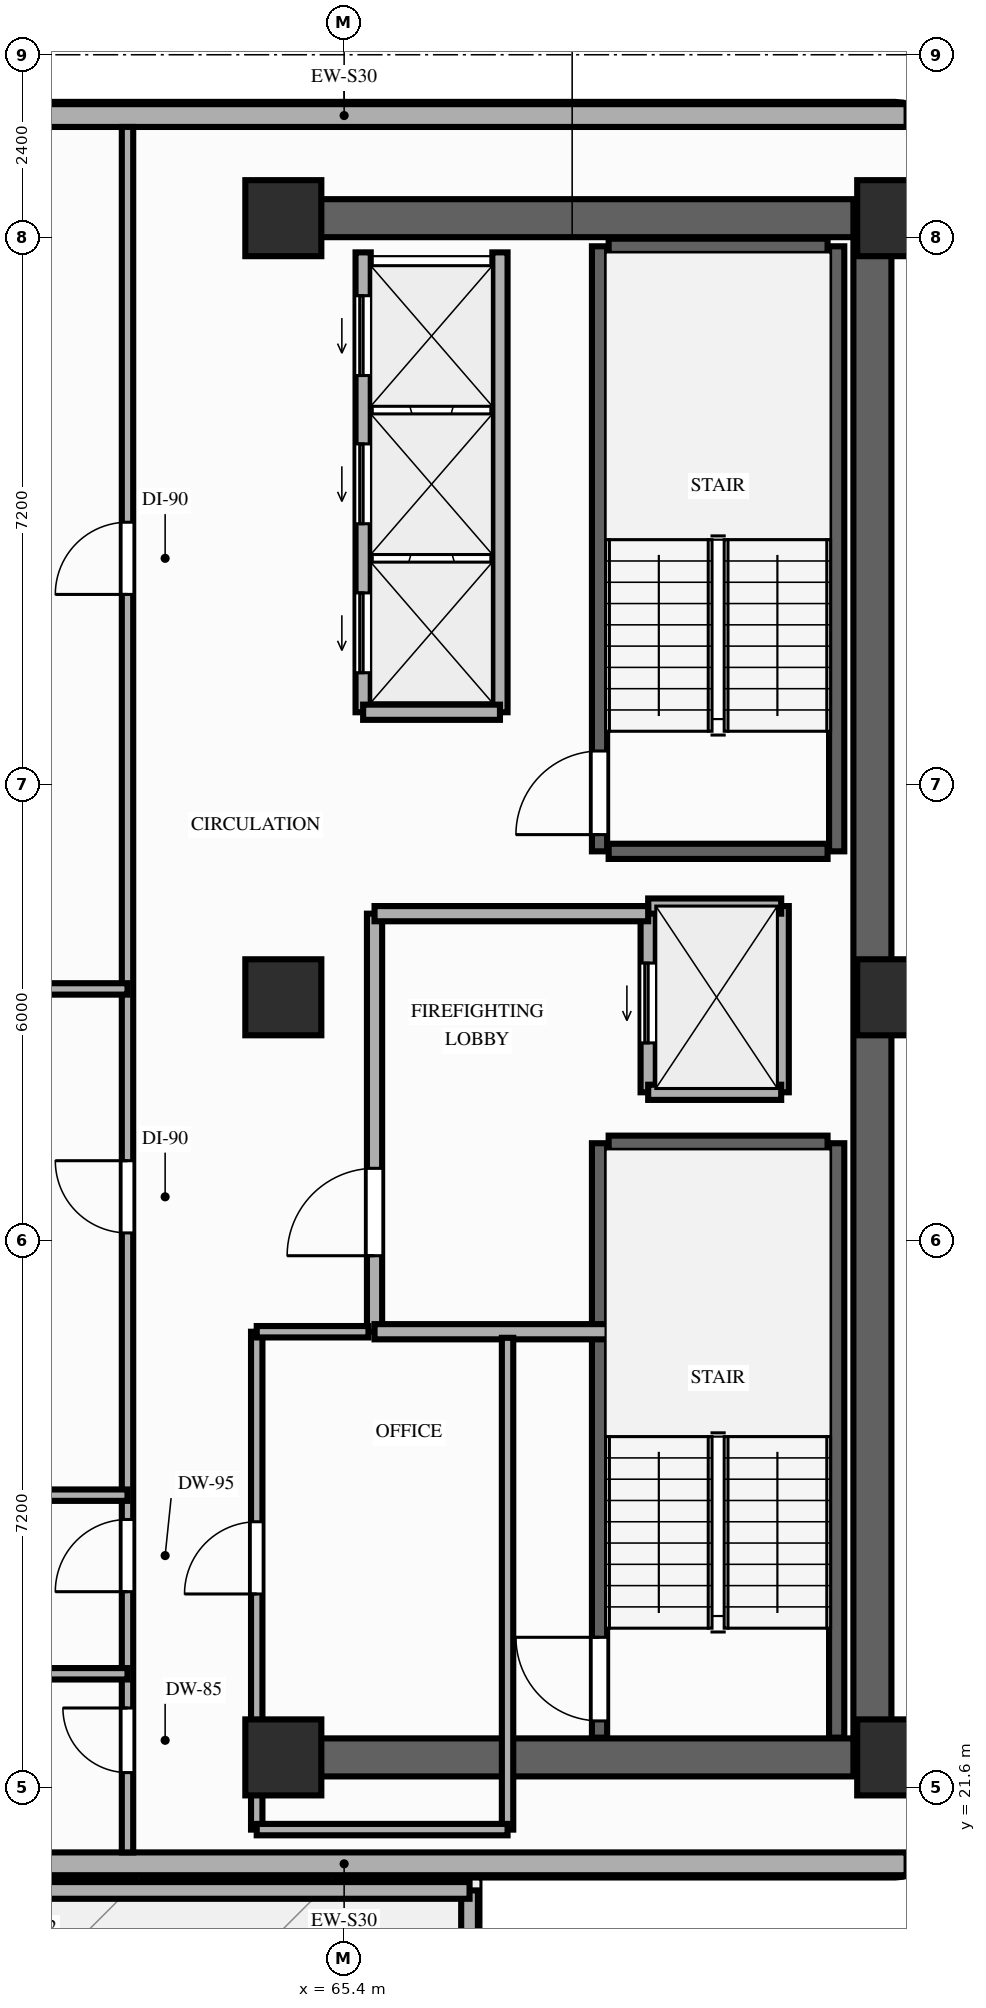
"""IFC4 building model, lengths in metres.
Left out: names, types, materials, properties, quantities, classifications, styles, units other than length and angle.
Written with IfcOpenShell. Run it as: python <this file> out.ifc"""

import sys

from ifc_helpers import new_model, si_unit, direction, frame, frame_2d, origin, origin_2d, place, context, subcontext, project, spatial, rectangle, extrude, element, fill, save


model = new_model("IFC4")
c1 = context("Model", 3, precision=1e-05, world=origin(), true_north=direction((0.0, 1.0)))
c2 = subcontext(c1, "Body", "Model", "MODEL_VIEW")
j1 = project(units=[si_unit("LENGTHUNIT", "METRE"), si_unit("PLANEANGLEUNIT", "RADIAN")], contexts=[c1])
p1 = place(None, origin())
s1 = spatial("IfcSite", under=j1, at=p1, CompositionType="ELEMENT")
p2 = place(p1, origin())
s2 = spatial("IfcBuilding", under=s1, at=p2, CompositionType="ELEMENT")
p3 = place(p2, frame((0.0, 0.0, 86.6)))
s3 = spatial("IfcBuildingStorey", under=s2, at=p3, CompositionType="ELEMENT", Elevation=86.6)
for number, where, z_axis, x_axis in (
    (1, (64.6, 22.0, 0.0), (0.0, 0.0, 1.0), (1.0, 0.0, 0.0)),
    (2, (72.65, 22.0, 0.0), (0.0, 0.0, 1.0), (1.0, 0.0, 0.0)),
    (3, (64.6, 32.0, 0.0), (0.0, 0.0, 1.0), (1.0, 0.0, 0.0)),
    (4, (72.65, 32.0, 0.0), (0.0, 0.0, 1.0), (1.0, 0.0, 0.0)),
    (5, (64.6, 42.25, 0.0), (0.0, 0.0, 1.0), (1.0, 0.0, 0.0)),
    (6, (72.65, 42.25, 0.0), (0.0, 0.0, 1.0), (1.0, 0.0, 0.0)),
):
    element("IfcColumn", number, at=place(p3, frame(where, z_axis=z_axis, x_axis=x_axis)), inside=s3, PredefinedType="COLUMN", context=c2, shape_type="SweptSolid", body=[
        extrude(rectangle(XDim=1.0, YDim=1.0, at=origin_2d()), origin(), (0.0, 0.0, 1.0), 3.2),
    ])
for number, where, z_axis, x_axis in (
    (7, (72.8, 43.6, 0.0), (0.0, 0.0, 1.0), (-1.0, 0.0, 0.0)),
    (8, (58.0, 20.6, 0.0), (0.0, 0.0, 1.0), (1.0, 0.0, 0.0)),
):
    element("IfcWall", number, at=place(p3, frame(where, z_axis=z_axis, x_axis=x_axis)), inside=s3, PredefinedType="STANDARD", context=c2, shape_type="SweptSolid", body=[
        extrude(rectangle(XDim=14.8, YDim=0.3, at=frame_2d((7.4, 0.0))), origin(), (0.0, 0.0, 1.0), 3.02),
    ])
p4 = place(p3, frame((67.05, 7.35, 0.0), z_axis=(0.0, 0.0, 1.0), x_axis=(0.0, 1.0, 0.0)))
e9 = element("IfcWall", 9, at=p4, inside=s3, PredefinedType="PARAPET", context=c2, shape_type="SweptSolid", body=[
    extrude(rectangle(XDim=12.9, YDim=0.22, at=frame_2d((6.45, 0.0))), origin(), (0.0, 0.0, 1.0), 1.15),
])
p5 = place(p3, frame((67.05, 20.25, 0.0), z_axis=(0.0, 0.0, 1.0), x_axis=(-1.0, 0.0, 0.0)))
e10 = element("IfcWall", 10, at=p5, inside=s3, PredefinedType="PARAPET", context=c2, shape_type="SweptSolid", body=[
    extrude(rectangle(XDim=11.7, YDim=0.22, at=frame_2d((5.85, 0.0))), origin(), (0.0, 0.0, 1.0), 1.15),
])
p6 = place(p3, frame((72.35, 22.0, 0.0), z_axis=(0.0, 0.0, 1.0), x_axis=(0.0, 1.0, 0.0)))
e11 = element("IfcWall", 11, at=p6, inside=s3, PredefinedType="SHEAR", context=c2, shape_type="SweptSolid", body=[
    extrude(rectangle(XDim=20.25, YDim=0.5, at=frame_2d((10.125, 0.0))), origin(), (0.0, 0.0, 1.0), 3.02),
])
for number, where, z_axis, x_axis in (
    (12, (64.6, 42.25, 0.0), (0.0, 0.0, 1.0), (1.0, 0.0, 0.0)),
    (13, (64.6, 22.0, 0.0), (0.0, 0.0, 1.0), (1.0, 0.0, 0.0)),
):
    element("IfcWall", number, at=place(p3, frame(where, z_axis=z_axis, x_axis=x_axis)), inside=s3, PredefinedType="SHEAR", context=c2, shape_type="SweptSolid", body=[
        extrude(rectangle(XDim=7.5, YDim=0.5, at=frame_2d((3.75, 0.0))), origin(), (0.0, 0.0, 1.0), 3.02),
    ])
p7 = place(p3, frame((68.76, 22.26, 0.0), z_axis=(0.0, 0.0, 1.0), x_axis=(0.0, 1.0, 0.0)))
e14 = element("IfcWall", 14, at=p7, inside=s3, PredefinedType="SHEAR", context=c2, shape_type="SweptSolid", body=[
    extrude(rectangle(XDim=7.82, YDim=0.2, at=frame_2d((3.91, 0.0))), origin(), (0.0, 0.0, 1.0), 3.02),
])
p8 = place(p7, frame((0.22, 0.0, 0.0)))
e15 = element("IfcOpeningElement", 15, at=p8, cuts=e14, PredefinedType="OPENING", context=c2, shape_type="SweptSolid", body=[
    extrude(rectangle(XDim=1.1, YDim=2.15, at=frame_2d((0.55, 1.075))), frame((0.0, 0.11, 0.0), z_axis=(0.0, -1.0, 0.0), x_axis=(1.0, 0.0, 0.0)), (0.0, 0.0, 1.0), 0.22),
])
p9 = place(p3, frame((71.88, 22.26, 0.0), z_axis=(0.0, 0.0, 1.0), x_axis=(0.0, 1.0, 0.0)))
e16 = element("IfcWall", 16, at=p9, inside=s3, PredefinedType="SHEAR", context=c2, shape_type="SweptSolid", body=[
    extrude(rectangle(XDim=7.82, YDim=0.2, at=frame_2d((3.91, 0.0))), origin(), (0.0, 0.0, 1.0), 3.02),
])
p10 = place(p3, frame((68.88, 30.08, 0.0), z_axis=(0.0, 0.0, 1.0), x_axis=(1.0, 0.0, 0.0)))
e17 = element("IfcWall", 17, at=p10, inside=s3, PredefinedType="SHEAR", context=c2, shape_type="SweptSolid", body=[
    extrude(rectangle(XDim=2.88, YDim=0.2, at=frame_2d((1.44, 0.0))), origin(), (0.0, 0.0, 1.0), 3.02),
])
p11 = place(p3, frame((68.76, 33.92, 0.0), z_axis=(0.0, 0.0, 1.0), x_axis=(0.0, 1.0, 0.0)))
e18 = element("IfcWall", 18, at=p11, inside=s3, PredefinedType="SHEAR", context=c2, shape_type="SweptSolid", body=[
    extrude(rectangle(XDim=7.96, YDim=0.2, at=frame_2d((3.98, 0.0))), origin(), (0.0, 0.0, 1.0), 3.02),
])
p12 = place(p11, frame((0.22, 0.0, 0.0)))
e19 = element("IfcOpeningElement", 19, at=p12, cuts=e18, PredefinedType="OPENING", context=c2, shape_type="SweptSolid", body=[
    extrude(rectangle(XDim=1.1, YDim=2.15, at=frame_2d((0.55, 1.075))), frame((0.0, 0.11, 0.0), z_axis=(0.0, -1.0, 0.0), x_axis=(1.0, 0.0, 0.0)), (0.0, 0.0, 1.0), 0.22),
])
p13 = place(p3, frame((71.88, 33.92, 0.0), z_axis=(0.0, 0.0, 1.0), x_axis=(0.0, 1.0, 0.0)))
e20 = element("IfcWall", 20, at=p13, inside=s3, PredefinedType="SHEAR", context=c2, shape_type="SweptSolid", body=[
    extrude(rectangle(XDim=7.96, YDim=0.2, at=frame_2d((3.98, 0.0))), origin(), (0.0, 0.0, 1.0), 3.02),
])
for number, where, z_axis, x_axis in (
    (21, (68.88, 41.88, 0.0), (0.0, 0.0, 1.0), (1.0, 0.0, 0.0)),
    (22, (68.88, 33.92, 0.0), (0.0, 0.0, 1.0), (1.0, 0.0, 0.0)),
):
    element("IfcWall", number, at=place(p3, frame(where, z_axis=z_axis, x_axis=x_axis)), inside=s3, PredefinedType="SHEAR", context=c2, shape_type="SweptSolid", body=[
        extrude(rectangle(XDim=2.88, YDim=0.2, at=frame_2d((1.44, 0.0))), origin(), (0.0, 0.0, 1.0), 3.02),
    ])
p14 = place(p3, frame((65.65, 35.75, 0.0), z_axis=(0.0, 0.0, 1.0), x_axis=(0.0, 1.0, 0.0)))
e23 = element("IfcWall", 23, at=p14, inside=s3, PredefinedType="MOVABLE", context=c2, shape_type="SweptSolid", body=[
    extrude(rectangle(XDim=6.05, YDim=0.2, at=frame_2d((3.025, 0.0))), origin(), (0.0, 0.0, 1.0), 3.02),
])
p15 = place(p14, frame((0.52, 0.0, 0.0)))
e24 = element("IfcOpeningElement", 24, at=p15, cuts=e23, PredefinedType="OPENING", context=c2, shape_type="SweptSolid", body=[
    extrude(rectangle(XDim=1.05, YDim=2.15, at=frame_2d((0.525, 1.075))), frame((0.0, 0.11, 0.0), z_axis=(0.0, -1.0, 0.0), x_axis=(1.0, 0.0, 0.0)), (0.0, 0.0, 1.0), 0.22),
])
p16 = place(p14, frame((2.48, 0.0, 0.0)))
e25 = element("IfcOpeningElement", 25, at=p16, cuts=e23, PredefinedType="OPENING", context=c2, shape_type="SweptSolid", body=[
    extrude(rectangle(XDim=1.05, YDim=2.15, at=frame_2d((0.525, 1.075))), frame((0.0, 0.11, 0.0), z_axis=(0.0, -1.0, 0.0), x_axis=(1.0, 0.0, 0.0)), (0.0, 0.0, 1.0), 0.22),
])
p17 = place(p14, frame((4.43, 0.0, 0.0)))
e26 = element("IfcOpeningElement", 26, at=p17, cuts=e23, PredefinedType="OPENING", context=c2, shape_type="SweptSolid", body=[
    extrude(rectangle(XDim=1.05, YDim=2.15, at=frame_2d((0.525, 1.075))), frame((0.0, 0.11, 0.0), z_axis=(0.0, -1.0, 0.0), x_axis=(1.0, 0.0, 0.0)), (0.0, 0.0, 1.0), 0.22),
])
p18 = place(p3, frame((67.45, 35.75, 0.0), z_axis=(0.0, 0.0, 1.0), x_axis=(0.0, 1.0, 0.0)))
e27 = element("IfcWall", 27, at=p18, inside=s3, PredefinedType="MOVABLE", context=c2, shape_type="SweptSolid", body=[
    extrude(rectangle(XDim=6.05, YDim=0.2, at=frame_2d((3.025, 0.0))), origin(), (0.0, 0.0, 1.0), 3.02),
])
p19 = place(p3, frame((65.65, 35.75, 0.0), z_axis=(0.0, 0.0, 1.0), x_axis=(1.0, 0.0, 0.0)))
e28 = element("IfcWall", 28, at=p19, inside=s3, PredefinedType="MOVABLE", context=c2, shape_type="SweptSolid", body=[
    extrude(rectangle(XDim=1.8, YDim=0.2, at=frame_2d((0.9, 0.0))), origin(), (0.0, 0.0, 1.0), 3.02),
])
p20 = place(p3, frame((69.4, 30.75, 0.0), z_axis=(0.0, 0.0, 1.0), x_axis=(0.0, 1.0, 0.0)))
e29 = element("IfcWall", 29, at=p20, inside=s3, PredefinedType="MOVABLE", context=c2, shape_type="SweptSolid", body=[
    extrude(rectangle(XDim=2.45, YDim=0.2, at=frame_2d((1.225, 0.0))), origin(), (0.0, 0.0, 1.0), 3.02),
])
p21 = place(p20, frame((0.65, 0.0, 0.0)))
e30 = element("IfcOpeningElement", 30, at=p21, cuts=e29, PredefinedType="OPENING", context=c2, shape_type="SweptSolid", body=[
    extrude(rectangle(XDim=1.05, YDim=2.15, at=frame_2d((0.525, 1.075))), frame((0.0, 0.11, 0.0), z_axis=(0.0, -1.0, 0.0), x_axis=(1.0, 0.0, 0.0)), (0.0, 0.0, 1.0), 0.22),
])
p22 = place(p3, frame((71.15, 30.75, 0.0), z_axis=(0.0, 0.0, 1.0), x_axis=(0.0, 1.0, 0.0)))
e31 = element("IfcWall", 31, at=p22, inside=s3, PredefinedType="MOVABLE", context=c2, shape_type="SweptSolid", body=[
    extrude(rectangle(XDim=2.45, YDim=0.2, at=frame_2d((1.225, 0.0))), origin(), (0.0, 0.0, 1.0), 3.02),
])
for number, where, z_axis, x_axis in (
    (32, (69.4, 33.2, 0.0), (0.0, 0.0, 1.0), (1.0, 0.0, 0.0)),
    (33, (69.4, 30.75, 0.0), (0.0, 0.0, 1.0), (1.0, 0.0, 0.0)),
):
    element("IfcWall", number, at=place(p3, frame(where, z_axis=z_axis, x_axis=x_axis)), inside=s3, PredefinedType="MOVABLE", context=c2, shape_type="SweptSolid", body=[
        extrude(rectangle(XDim=1.75, YDim=0.2, at=frame_2d((0.875, 0.0))), origin(), (0.0, 0.0, 1.0), 3.02),
    ])
p23 = place(p3, frame((65.8, 27.6, 0.0), z_axis=(0.0, 0.0, 1.0), x_axis=(0.0, 1.0, 0.0)))
e34 = element("IfcWall", 34, at=p23, inside=s3, PredefinedType="PARTITIONING", context=c2, shape_type="SweptSolid", body=[
    extrude(rectangle(XDim=5.5, YDim=0.2, at=frame_2d((2.75, 0.0))), origin(), (0.0, 0.0, 1.0), 3.02),
])
p24 = place(p23, frame((1.0, 0.0, 0.0)))
e35 = element("IfcOpeningElement", 35, at=p24, cuts=e34, PredefinedType="OPENING", context=c2, shape_type="SweptSolid", body=[
    extrude(rectangle(XDim=1.15, YDim=2.15, at=frame_2d((0.575, 1.075))), frame((0.0, 0.11, 0.0), z_axis=(0.0, -1.0, 0.0), x_axis=(1.0, 0.0, 0.0)), (0.0, 0.0, 1.0), 0.22),
])
p25 = place(p3, frame((65.8, 33.1, 0.0), z_axis=(0.0, 0.0, 1.0), x_axis=(1.0, 0.0, 0.0)))
e36 = element("IfcWall", 36, at=p25, inside=s3, PredefinedType="PARTITIONING", context=c2, shape_type="SweptSolid", body=[
    extrude(rectangle(XDim=3.6, YDim=0.2, at=frame_2d((1.8, 0.0))), origin(), (0.0, 0.0, 1.0), 3.02),
])
p26 = place(p3, frame((65.8, 27.6, 0.0), z_axis=(0.0, 0.0, 1.0), x_axis=(1.0, 0.0, 0.0)))
e37 = element("IfcWall", 37, at=p26, inside=s3, PredefinedType="PARTITIONING", context=c2, shape_type="SweptSolid", body=[
    extrude(rectangle(XDim=3.4, YDim=0.2, at=frame_2d((1.7, 0.0))), origin(), (0.0, 0.0, 1.0), 3.02),
])
p27 = place(p3, frame((64.25, 21.05, 0.0), z_axis=(0.0, 0.0, 1.0), x_axis=(0.0, 1.0, 0.0)))
e38 = element("IfcWall", 38, at=p27, inside=s3, PredefinedType="PARTITIONING", context=c2, shape_type="SweptSolid", body=[
    extrude(rectangle(XDim=6.55, YDim=0.15, at=frame_2d((3.275, 0.0))), origin(), (0.0, 0.0, 1.0), 2.6),
])
p28 = place(p27, frame((3.1, 0.0, 0.0)))
e39 = element("IfcOpeningElement", 39, at=p28, cuts=e38, PredefinedType="OPENING", context=c2, shape_type="SweptSolid", body=[
    extrude(rectangle(XDim=0.95, YDim=2.15, at=frame_2d((0.475, 1.075))), frame((0.0, 0.085, 0.0), z_axis=(0.0, -1.0, 0.0), x_axis=(1.0, 0.0, 0.0)), (0.0, 0.0, 1.0), 0.17),
])
p29 = place(p3, frame((67.55, 21.05, 0.0), z_axis=(0.0, 0.0, 1.0), x_axis=(0.0, 1.0, 0.0)))
e40 = element("IfcWall", 40, at=p29, inside=s3, PredefinedType="PARTITIONING", context=c2, shape_type="SweptSolid", body=[
    extrude(rectangle(XDim=6.47, YDim=0.15, at=frame_2d((3.235, 0.0))), origin(), (0.0, 0.0, 1.0), 2.6),
])
p30 = place(p3, frame((64.25, 21.05, 0.0), z_axis=(0.0, 0.0, 1.0), x_axis=(1.0, 0.0, 0.0)))
e41 = element("IfcWall", 41, at=p30, inside=s3, PredefinedType="PARTITIONING", context=c2, shape_type="SweptSolid", body=[
    extrude(rectangle(XDim=3.3, YDim=0.15, at=frame_2d((1.65, 0.0))), origin(), (0.0, 0.0, 1.0), 3.02),
])
p31 = place(p3, frame((64.25, 27.6, 0.0), z_axis=(0.0, 0.0, 1.0), x_axis=(1.0, 0.0, 0.0)))
e42 = element("IfcWall", 42, at=p31, inside=s3, PredefinedType="PARTITIONING", context=c2, shape_type="SweptSolid", body=[
    extrude(rectangle(XDim=1.47, YDim=0.15, at=frame_2d((0.735, 0.0))), origin(), (0.0, 0.0, 1.0), 2.6),
])
p32 = place(p3, frame((62.55, 20.75, 0.0), z_axis=(0.0, 0.0, 1.0), x_axis=(0.0, 1.0, 0.0)))
e43 = element("IfcWall", 43, at=p32, inside=s3, PredefinedType="PARTITIONING", context=c2, shape_type="SweptSolid", body=[
    extrude(rectangle(XDim=22.7, YDim=0.15, at=frame_2d((11.35, 0.0))), origin(), (0.0, 0.0, 1.0), 2.6),
])
p33 = place(p32, frame((1.05, 0.0, 0.0)))
e44 = element("IfcOpeningElement", 44, at=p33, cuts=e43, PredefinedType="OPENING", context=c2, shape_type="SweptSolid", body=[
    extrude(rectangle(XDim=0.85, YDim=2.1, at=frame_2d((0.425, 1.05))), frame((0.0, 0.085, 0.0), z_axis=(0.0, -1.0, 0.0), x_axis=(1.0, 0.0, 0.0)), (0.0, 0.0, 1.0), 0.17),
])
p34 = place(p32, frame((3.43, 0.0, 0.0)))
e45 = element("IfcOpeningElement", 45, at=p34, cuts=e43, PredefinedType="OPENING", context=c2, shape_type="SweptSolid", body=[
    extrude(rectangle(XDim=0.95, YDim=2.1, at=frame_2d((0.475, 1.05))), frame((0.0, 0.085, 0.0), z_axis=(0.0, -1.0, 0.0), x_axis=(1.0, 0.0, 0.0)), (0.0, 0.0, 1.0), 0.17),
])
p35 = place(p32, frame((8.15, 0.0, 0.0)))
e46 = element("IfcOpeningElement", 46, at=p35, cuts=e43, PredefinedType="OPENING", context=c2, shape_type="SweptSolid", body=[
    extrude(rectangle(XDim=0.95, YDim=2.15, at=frame_2d((0.475, 1.075))), frame((0.0, 0.085, 0.0), z_axis=(0.0, -1.0, 0.0), x_axis=(1.0, 0.0, 0.0)), (0.0, 0.0, 1.0), 0.17),
])
p36 = place(p32, frame((16.55, 0.0, 0.0)))
e47 = element("IfcOpeningElement", 47, at=p36, cuts=e43, PredefinedType="OPENING", context=c2, shape_type="SweptSolid", body=[
    extrude(rectangle(XDim=0.95, YDim=2.15, at=frame_2d((0.475, 1.075))), frame((0.0, 0.085, 0.0), z_axis=(0.0, -1.0, 0.0), x_axis=(1.0, 0.0, 0.0)), (0.0, 0.0, 1.0), 0.17),
])
for number, where, z_axis, x_axis in (
    (48, (57.95, 23.1, 0.0), (0.0, 0.0, 1.0), (1.0, 0.0, 0.0)),
    (49, (57.95, 25.45, 0.0), (0.0, 0.0, 1.0), (1.0, 0.0, 0.0)),
    (50, (57.95, 32.11, 0.0), (0.0, 0.0, 1.0), (1.0, 0.0, 0.0)),
):
    element("IfcWall", number, at=place(p3, frame(where, z_axis=z_axis, x_axis=x_axis)), inside=s3, PredefinedType="PARTITIONING", context=c2, shape_type="SweptSolid", body=[
        extrude(rectangle(XDim=4.6, YDim=0.15, at=frame_2d((2.3, 0.0))), origin(), (0.0, 0.0, 1.0), 2.6),
    ])
p37 = place(p8, origin())
e51 = element("IfcDoor", 51, at=p37, inside=s3, OperationType="SINGLE_SWING_RIGHT", PredefinedType="DOOR", context=c2, shape_type="SweptSolid", body=[
    extrude(rectangle(XDim=1.1, YDim=2.15, at=frame_2d((0.55, 1.075))), frame((0.0, 0.025, 0.0), z_axis=(0.0, -1.0, 0.0), x_axis=(1.0, 0.0, 0.0)), (0.0, 0.0, 1.0), 0.05),
])
fill(e15, e51)
p38 = place(p12, origin())
e52 = element("IfcDoor", 52, at=p38, inside=s3, OperationType="SINGLE_SWING_LEFT", PredefinedType="DOOR", context=c2, shape_type="SweptSolid", body=[
    extrude(rectangle(XDim=1.1, YDim=2.15, at=frame_2d((0.55, 1.075))), frame((0.0, 0.025, 0.0), z_axis=(0.0, -1.0, 0.0), x_axis=(1.0, 0.0, 0.0)), (0.0, 0.0, 1.0), 0.05),
])
fill(e19, e52)
p39 = place(p15, origin())
e53 = element("IfcDoor", 53, at=p39, inside=s3, OperationType="SLIDING_TO_LEFT", PredefinedType="DOOR", context=c2, shape_type="SweptSolid", body=[
    extrude(rectangle(XDim=1.05, YDim=2.15, at=frame_2d((0.525, 1.075))), frame((0.0, 0.025, 0.0), z_axis=(0.0, -1.0, 0.0), x_axis=(1.0, 0.0, 0.0)), (0.0, 0.0, 1.0), 0.05),
])
fill(e24, e53)
p40 = place(p16, origin())
e54 = element("IfcDoor", 54, at=p40, inside=s3, OperationType="SLIDING_TO_LEFT", PredefinedType="DOOR", context=c2, shape_type="SweptSolid", body=[
    extrude(rectangle(XDim=1.05, YDim=2.15, at=frame_2d((0.525, 1.075))), frame((0.0, 0.025, 0.0), z_axis=(0.0, -1.0, 0.0), x_axis=(1.0, 0.0, 0.0)), (0.0, 0.0, 1.0), 0.05),
])
fill(e25, e54)
p41 = place(p17, origin())
e55 = element("IfcDoor", 55, at=p41, inside=s3, OperationType="SLIDING_TO_LEFT", PredefinedType="DOOR", context=c2, shape_type="SweptSolid", body=[
    extrude(rectangle(XDim=1.05, YDim=2.15, at=frame_2d((0.525, 1.075))), frame((0.0, 0.025, 0.0), z_axis=(0.0, -1.0, 0.0), x_axis=(1.0, 0.0, 0.0)), (0.0, 0.0, 1.0), 0.05),
])
fill(e26, e55)
p42 = place(p21, origin())
e56 = element("IfcDoor", 56, at=p42, inside=s3, OperationType="SLIDING_TO_LEFT", PredefinedType="DOOR", context=c2, shape_type="SweptSolid", body=[
    extrude(rectangle(XDim=1.05, YDim=2.15, at=frame_2d((0.525, 1.075))), frame((0.0, 0.025, 0.0), z_axis=(0.0, -1.0, 0.0), x_axis=(1.0, 0.0, 0.0)), (0.0, 0.0, 1.0), 0.05),
])
fill(e30, e56)
p43 = place(p24, origin())
e57 = element("IfcDoor", 57, at=p43, inside=s3, OperationType="SINGLE_SWING_LEFT", PredefinedType="DOOR", context=c2, shape_type="SweptSolid", body=[
    extrude(rectangle(XDim=1.15, YDim=2.15, at=frame_2d((0.575, 1.075))), frame((0.0, 0.025, 0.0), z_axis=(0.0, -1.0, 0.0), x_axis=(1.0, 0.0, 0.0)), (0.0, 0.0, 1.0), 0.05),
])
fill(e35, e57)
p44 = place(p28, origin())
e58 = element("IfcDoor", 58, at=p44, inside=s3, OperationType="SINGLE_SWING_LEFT", PredefinedType="DOOR", context=c2, shape_type="SweptSolid", body=[
    extrude(rectangle(XDim=0.95, YDim=2.15, at=frame_2d((0.475, 1.075))), frame((0.0, 0.025, 0.0), z_axis=(0.0, -1.0, 0.0), x_axis=(1.0, 0.0, 0.0)), (0.0, 0.0, 1.0), 0.05),
])
fill(e39, e58)
p45 = place(p33, origin())
e59 = element("IfcDoor", 59, at=p45, inside=s3, OperationType="SINGLE_SWING_RIGHT", PredefinedType="DOOR", context=c2, shape_type="SweptSolid", body=[
    extrude(rectangle(XDim=0.85, YDim=2.1, at=frame_2d((0.425, 1.05))), frame((0.0, 0.025, 0.0), z_axis=(0.0, -1.0, 0.0), x_axis=(1.0, 0.0, 0.0)), (0.0, 0.0, 1.0), 0.05),
])
fill(e44, e59)
p46 = place(p34, origin())
e60 = element("IfcDoor", 60, at=p46, inside=s3, OperationType="SINGLE_SWING_LEFT", PredefinedType="DOOR", context=c2, shape_type="SweptSolid", body=[
    extrude(rectangle(XDim=0.95, YDim=2.1, at=frame_2d((0.475, 1.05))), frame((0.0, 0.025, 0.0), z_axis=(0.0, -1.0, 0.0), x_axis=(1.0, 0.0, 0.0)), (0.0, 0.0, 1.0), 0.05),
])
fill(e45, e60)
p47 = place(p35, origin())
e61 = element("IfcDoor", 61, at=p47, inside=s3, OperationType="SINGLE_SWING_RIGHT", PredefinedType="DOOR", context=c2, shape_type="SweptSolid", body=[
    extrude(rectangle(XDim=0.95, YDim=2.15, at=frame_2d((0.475, 1.075))), frame((0.0, 0.025, 0.0), z_axis=(0.0, -1.0, 0.0), x_axis=(1.0, 0.0, 0.0)), (0.0, 0.0, 1.0), 0.05),
])
fill(e46, e61)
p48 = place(p36, origin())
e62 = element("IfcDoor", 62, at=p48, inside=s3, OperationType="SINGLE_SWING_LEFT", PredefinedType="DOOR", context=c2, shape_type="SweptSolid", body=[
    extrude(rectangle(XDim=0.95, YDim=2.15, at=frame_2d((0.475, 1.075))), frame((0.0, 0.025, 0.0), z_axis=(0.0, -1.0, 0.0), x_axis=(1.0, 0.0, 0.0)), (0.0, 0.0, 1.0), 0.05),
])
fill(e47, e62)
save(model, sys.argv[1])
